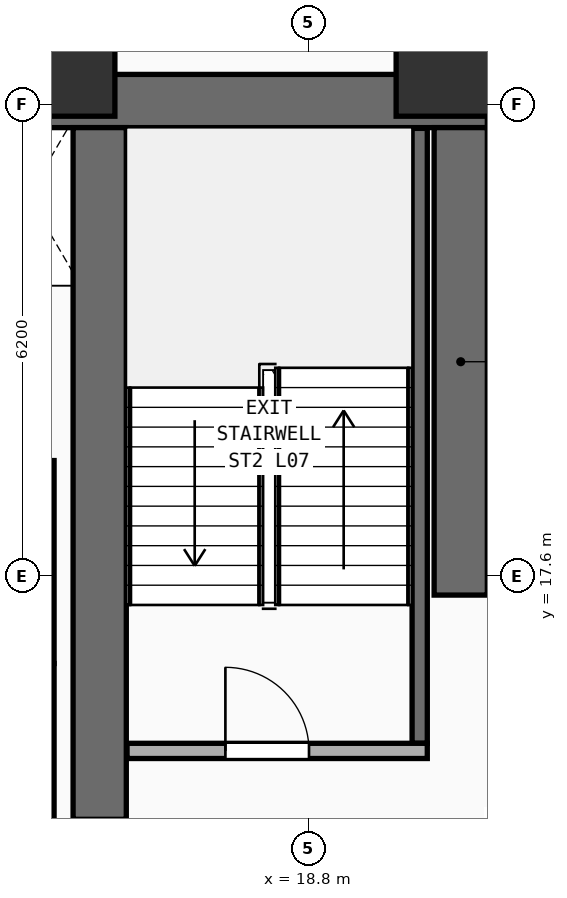
"""IFC4 building model, lengths in metres.
Left out: names, types, materials, properties, quantities, classifications, styles, units other than length and angle.
Written with IfcOpenShell. Run it as: python <this file> out.ifc"""

import sys

from ifc_helpers import new_model, si_unit, direction, frame, frame_2d, origin, origin_2d, place, context, subcontext, project, spatial, rectangle, extrude, element, fill, save


model = new_model("IFC4")
c1 = context("Model", 3, precision=1e-05, world=origin(), true_north=direction((0.0, 1.0)))
c2 = subcontext(c1, "Body", "Model", "MODEL_VIEW")
j1 = project(units=[si_unit("LENGTHUNIT", "METRE"), si_unit("PLANEANGLEUNIT", "RADIAN")], contexts=[c1])
p1 = place(None, origin())
s1 = spatial("IfcSite", under=j1, at=p1, CompositionType="ELEMENT")
p2 = place(p1, origin())
s2 = spatial("IfcBuilding", under=s1, at=p2, CompositionType="ELEMENT")
p3 = place(p2, frame((0.0, 0.0, 29.6)))
s3 = spatial("IfcBuildingStorey", under=s2, at=p3, CompositionType="ELEMENT", Elevation=29.6)
p4 = place(p3, frame((7.1, 23.85, 0.0), z_axis=(0.0, 0.0, 1.0), x_axis=(1.0, 0.0, 0.0)))
e1 = element("IfcWall", 1, at=p4, inside=s3, PredefinedType="SHEAR", context=c2, shape_type="SweptSolid", body=[
    extrude(rectangle(XDim=14.05, YDim=0.7, at=frame_2d((7.025, 0.0))), origin(), (0.0, 0.0, 1.0), 3.54),
])
p5 = place(p3, frame((20.8, 17.35, 0.0), z_axis=(0.0, 0.0, 1.0), x_axis=(0.0, 1.0, 0.0)))
e2 = element("IfcWall", 2, at=p5, inside=s3, PredefinedType="SHEAR", context=c2, shape_type="SweptSolid", body=[
    extrude(rectangle(XDim=6.15, YDim=0.7, at=frame_2d((3.075, 0.0))), origin(), (0.0, 0.0, 1.0), 3.54),
])
p6 = place(p3, frame((16.05, 14.4, 0.0), z_axis=(0.0, 0.0, 1.0), x_axis=(0.0, 1.0, 0.0)))
e3 = element("IfcWall", 3, at=p6, inside=s3, PredefinedType="SHEAR", context=c2, shape_type="SweptSolid", body=[
    extrude(rectangle(XDim=9.1, YDim=0.7, at=frame_2d((4.55, 0.0))), origin(), (0.0, 0.0, 1.0), 3.54),
])
for number, where, z_axis, x_axis in (
    (4, (15.45, 24.45, 0.0), (0.0, 0.0, 1.0), (1.0, 0.0, 0.0)),
    (5, (20.75, 24.45, 0.0), (0.0, 0.0, 1.0), (1.0, 0.0, 0.0)),
):
    element("IfcColumn", number, at=place(p3, frame(where, z_axis=z_axis, x_axis=x_axis)), inside=s3, PredefinedType="COLUMN", context=c2, shape_type="SweptSolid", body=[
        extrude(rectangle(XDim=1.6, YDim=1.6, at=origin_2d()), origin(), (0.0, 0.0, 1.0), 3.54),
    ])
p7 = place(p3, frame((20.26, 15.4, 0.0), z_axis=(0.0, 0.0, 1.0), x_axis=(0.0, 1.0, 0.0)))
e6 = element("IfcWall", 6, at=p7, inside=s3, PredefinedType="SHEAR", context=c2, shape_type="SweptSolid", body=[
    extrude(rectangle(XDim=8.09, YDim=0.2, at=frame_2d((4.045, 0.0))), origin(), (0.0, 0.0, 1.0), 3.54),
])
p8 = place(p3, frame((16.41, 15.3, 0.0), z_axis=(0.0, 0.0, 1.0), x_axis=(1.0, 0.0, 0.0)))
e7 = element("IfcWall", 7, at=p8, inside=s3, PredefinedType="PARTITIONING", context=c2, shape_type="SweptSolid", body=[
    extrude(rectangle(XDim=3.95, YDim=0.2, at=frame_2d((1.975, 0.0))), origin(), (0.0, 0.0, 1.0), 3.54),
])
p9 = place(p8, frame((1.294, 0.0, 0.0)))
e8 = element("IfcOpeningElement", 8, at=p9, cuts=e7, PredefinedType="OPENING", context=c2, shape_type="SweptSolid", body=[
    extrude(rectangle(XDim=1.1, YDim=2.2, at=frame_2d((0.55, 1.1))), frame((0.0, 0.11, 0.0), z_axis=(0.0, -1.0, 0.0), x_axis=(1.0, 0.0, 0.0)), (0.0, 0.0, 1.0), 0.22),
])
p10 = place(p3, frame((15.35, 14.22, 0.0), z_axis=(0.0, 0.0, 1.0), x_axis=(0.0, 1.0, 0.0)))
e9 = element("IfcWall", 9, at=p10, inside=s3, PredefinedType="PARTITIONING", context=c2, shape_type="SweptSolid", body=[
    extrude(rectangle(XDim=2.23, YDim=0.2, at=frame_2d((1.115, 0.0))), origin(), (0.0, 0.0, 1.0), 3.54),
])
p11 = place(p3, frame((15.35, 16.45, 0.0), z_axis=(0.0, 0.0, 1.0), x_axis=(0.0, 1.0, 0.0)))
e10 = element("IfcWall", 10, at=p11, inside=s3, PredefinedType="PARTITIONING", context=c2, shape_type="SweptSolid", body=[
    extrude(rectangle(XDim=2.67, YDim=0.2, at=frame_2d((1.335, 0.0))), origin(), (0.0, 0.0, 1.0), 3.54),
])
p12 = place(p9, origin())
e11 = element("IfcDoor", 11, at=p12, inside=s3, OperationType="SINGLE_SWING_LEFT", PredefinedType="DOOR", context=c2, shape_type="SweptSolid", body=[
    extrude(rectangle(XDim=1.1, YDim=2.2, at=frame_2d((0.55, 1.1))), frame((0.0, 0.025, 0.0), z_axis=(0.0, -1.0, 0.0), x_axis=(1.0, 0.0, 0.0)), (0.0, 0.0, 1.0), 0.05),
])
fill(e8, e11)
save(model, sys.argv[1])
